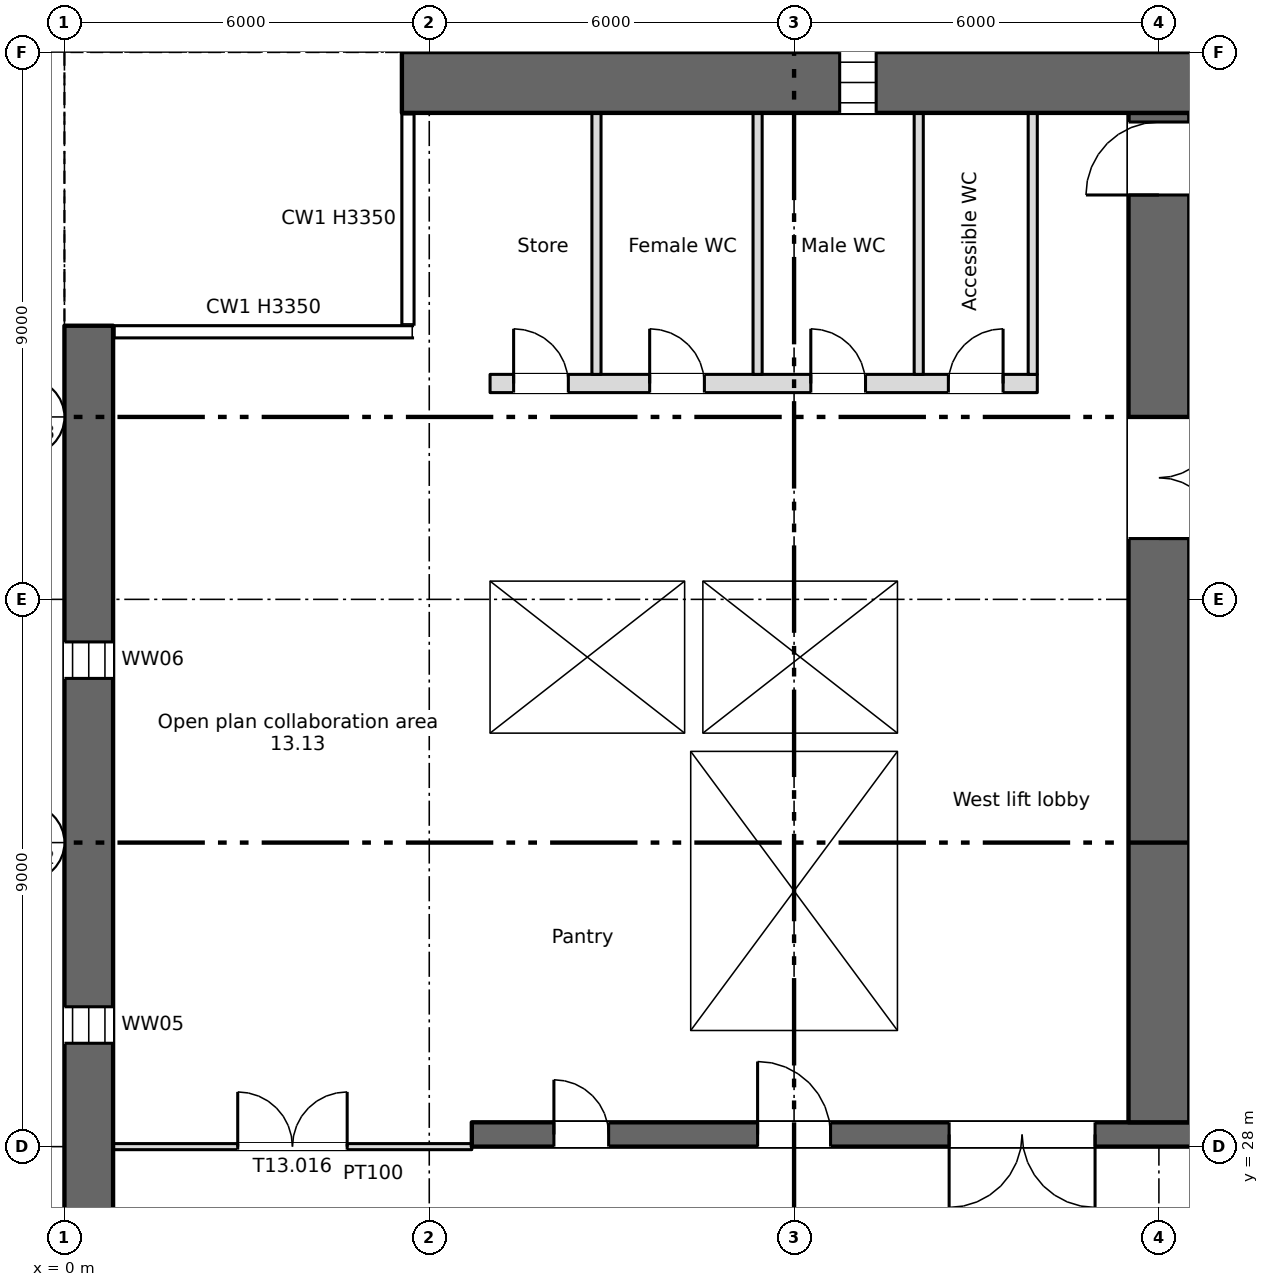
"""IFC4 building model, lengths in metres.
Left out: names, types, materials, properties, quantities, classifications, styles, units other than length and angle.
Written with IfcOpenShell. Run it as: python <this file> out.ifc"""

import sys

from ifc_helpers import new_model, si_unit, direction, frame, frame_2d, origin, place, context, subcontext, project, spatial, rectangle, extrude, element, fill, save


model = new_model("IFC4")
c1 = context("Model", 3, precision=1e-05, world=origin(), true_north=direction((0.0, 1.0)))
c2 = subcontext(c1, "Body", "Model", "MODEL_VIEW")
j1 = project(units=[si_unit("LENGTHUNIT", "METRE"), si_unit("PLANEANGLEUNIT", "RADIAN")], contexts=[c1])
p1 = place(None, origin())
s1 = spatial("IfcSite", under=j1, at=p1, CompositionType="ELEMENT")
p2 = place(p1, origin())
s2 = spatial("IfcBuilding", under=s1, at=p2, CompositionType="ELEMENT")
p3 = place(p2, frame((0.0, 0.0, 75.0)))
s3 = spatial("IfcBuildingStorey", under=s2, at=p3, CompositionType="ELEMENT", Elevation=75.0)
p4 = place(p3, frame((0.4, 4.5, 0.0), z_axis=(0.0, 0.0, 1.0), x_axis=(0.0, 1.0, 0.0)))
e1 = element("IfcWall", 1, at=p4, inside=s3, PredefinedType="SHEAR", context=c2, shape_type="SweptSolid", body=[
    extrude(rectangle(XDim=37.0, YDim=0.8, at=frame_2d((18.5, 0.0))), origin(), (0.0, 0.0, 1.0), 3.35),
])
p5 = place(p4, frame((1.2, 0.0, 0.6)))
e2 = element("IfcOpeningElement", 2, at=p5, cuts=e1, PredefinedType="OPENING", context=c2, shape_type="SweptSolid", body=[
    extrude(rectangle(XDim=0.6, YDim=2.4, at=frame_2d((0.3, 1.2))), frame((0.0, 0.41, 0.0), z_axis=(0.0, -1.0, 0.0), x_axis=(1.0, 0.0, 0.0)), (0.0, 0.0, 1.0), 0.82),
])
p6 = place(p4, frame((7.2, 0.0, 0.6)))
e3 = element("IfcOpeningElement", 3, at=p6, cuts=e1, PredefinedType="OPENING", context=c2, shape_type="SweptSolid", body=[
    extrude(rectangle(XDim=0.6, YDim=2.4, at=frame_2d((0.3, 1.2))), frame((0.0, 0.41, 0.0), z_axis=(0.0, -1.0, 0.0), x_axis=(1.0, 0.0, 0.0)), (0.0, 0.0, 1.0), 0.82),
])
p7 = place(p4, frame((13.2, 0.0, 0.6)))
e4 = element("IfcOpeningElement", 4, at=p7, cuts=e1, PredefinedType="OPENING", context=c2, shape_type="SweptSolid", body=[
    extrude(rectangle(XDim=0.6, YDim=2.4, at=frame_2d((0.3, 1.2))), frame((0.0, 0.41, 0.0), z_axis=(0.0, -1.0, 0.0), x_axis=(1.0, 0.0, 0.0)), (0.0, 0.0, 1.0), 0.82),
])
p8 = place(p4, frame((19.2, 0.0, 0.6)))
e5 = element("IfcOpeningElement", 5, at=p8, cuts=e1, PredefinedType="OPENING", context=c2, shape_type="SweptSolid", body=[
    extrude(rectangle(XDim=0.6, YDim=2.4, at=frame_2d((0.3, 1.2))), frame((0.0, 0.41, 0.0), z_axis=(0.0, -1.0, 0.0), x_axis=(1.0, 0.0, 0.0)), (0.0, 0.0, 1.0), 0.82),
])
p9 = place(p4, frame((25.2, 0.0, 0.6)))
e6 = element("IfcOpeningElement", 6, at=p9, cuts=e1, PredefinedType="OPENING", context=c2, shape_type="SweptSolid", body=[
    extrude(rectangle(XDim=0.6, YDim=2.4, at=frame_2d((0.3, 1.2))), frame((0.0, 0.41, 0.0), z_axis=(0.0, -1.0, 0.0), x_axis=(1.0, 0.0, 0.0)), (0.0, 0.0, 1.0), 0.82),
])
p10 = place(p4, frame((31.2, 0.0, 0.6)))
e7 = element("IfcOpeningElement", 7, at=p10, cuts=e1, PredefinedType="OPENING", context=c2, shape_type="SweptSolid", body=[
    extrude(rectangle(XDim=0.6, YDim=2.4, at=frame_2d((0.3, 1.2))), frame((0.0, 0.41, 0.0), z_axis=(0.0, -1.0, 0.0), x_axis=(1.0, 0.0, 0.0)), (0.0, 0.0, 1.0), 0.82),
])
p11 = place(p3, frame((5.55, 45.5, 0.0), z_axis=(0.0, 0.0, 1.0), x_axis=(1.0, 0.0, 0.0)))
e8 = element("IfcWall", 8, at=p11, inside=s3, PredefinedType="SHEAR", context=c2, shape_type="SweptSolid", body=[
    extrude(rectangle(XDim=66.9, YDim=1.0, at=frame_2d((33.45, 0.0))), origin(), (0.0, 0.0, 1.0), 3.35),
])
p12 = place(p11, frame((7.2, 0.0, 0.6)))
e9 = element("IfcOpeningElement", 9, at=p12, cuts=e8, PredefinedType="OPENING", context=c2, shape_type="SweptSolid", body=[
    extrude(rectangle(XDim=0.6, YDim=2.4, at=frame_2d((0.3, 1.2))), frame((0.0, 0.51, 0.0), z_axis=(0.0, -1.0, 0.0), x_axis=(1.0, 0.0, 0.0)), (0.0, 0.0, 1.0), 1.02),
])
p13 = place(p11, frame((61.2, 0.0, 0.6)))
e10 = element("IfcOpeningElement", 10, at=p13, cuts=e8, PredefinedType="OPENING", context=c2, shape_type="SweptSolid", body=[
    extrude(rectangle(XDim=0.6, YDim=2.4, at=frame_2d((0.3, 1.2))), frame((0.0, 0.51, 0.0), z_axis=(0.0, -1.0, 0.0), x_axis=(1.0, 0.0, 0.0)), (0.0, 0.0, 1.0), 1.02),
])
p14 = place(p3, frame((6.7, 28.2, 0.0), z_axis=(0.0, 0.0, 1.0), x_axis=(1.0, 0.0, 0.0)))
e11 = element("IfcWall", 11, at=p14, inside=s3, PredefinedType="SHEAR", context=c2, shape_type="SweptSolid", body=[
    extrude(rectangle(XDim=57.8, YDim=0.4, at=frame_2d((28.9, 0.0))), origin(), (0.0, 0.0, 1.0), 3.35),
])
p15 = place(p14, frame((12.062, 0.0, 0.0)))
e12 = element("IfcOpeningElement", 12, at=p15, cuts=e11, PredefinedType="OPENING", context=c2, shape_type="SweptSolid", body=[
    extrude(rectangle(XDim=0.9, YDim=2.1, at=frame_2d((0.45, 1.05))), frame((0.0, 0.21, 0.0), z_axis=(0.0, -1.0, 0.0), x_axis=(1.0, 0.0, 0.0)), (0.0, 0.0, 1.0), 0.42),
])
p16 = place(p14, frame((14.637, 0.0, 0.0)))
e13 = element("IfcOpeningElement", 13, at=p16, cuts=e11, PredefinedType="OPENING", context=c2, shape_type="SweptSolid", body=[
    extrude(rectangle(XDim=0.9, YDim=2.1, at=frame_2d((0.45, 1.05))), frame((0.0, 0.21, 0.0), z_axis=(0.0, -1.0, 0.0), x_axis=(1.0, 0.0, 0.0)), (0.0, 0.0, 1.0), 0.42),
])
p17 = place(p14, frame((49.062, 0.0, 0.0)))
e14 = element("IfcOpeningElement", 14, at=p17, cuts=e11, PredefinedType="OPENING", context=c2, shape_type="SweptSolid", body=[
    extrude(rectangle(XDim=0.9, YDim=2.1, at=frame_2d((0.45, 1.05))), frame((0.0, 0.21, 0.0), z_axis=(0.0, -1.0, 0.0), x_axis=(1.0, 0.0, 0.0)), (0.0, 0.0, 1.0), 0.42),
])
p18 = place(p14, frame((51.637, 0.0, 0.0)))
e15 = element("IfcOpeningElement", 15, at=p18, cuts=e11, PredefinedType="OPENING", context=c2, shape_type="SweptSolid", body=[
    extrude(rectangle(XDim=0.9, YDim=2.1, at=frame_2d((0.45, 1.05))), frame((0.0, 0.21, 0.0), z_axis=(0.0, -1.0, 0.0), x_axis=(1.0, 0.0, 0.0)), (0.0, 0.0, 1.0), 0.42),
])
p19 = place(p14, frame((1.35, 0.0, 0.0)))
e16 = element("IfcOpeningElement", 16, at=p19, cuts=e11, PredefinedType="OPENING", context=c2, shape_type="SweptSolid", body=[
    extrude(rectangle(XDim=0.9, YDim=2.1, at=frame_2d((0.45, 1.05))), frame((0.0, 0.21, 0.0), z_axis=(0.0, -1.0, 0.0), x_axis=(1.0, 0.0, 0.0)), (0.0, 0.0, 1.0), 0.42),
])
p20 = place(p14, frame((4.7, 0.0, 0.0)))
e17 = element("IfcOpeningElement", 17, at=p20, cuts=e11, PredefinedType="OPENING", context=c2, shape_type="SweptSolid", body=[
    extrude(rectangle(XDim=1.2, YDim=2.1, at=frame_2d((0.6, 1.05))), frame((0.0, 0.21, 0.0), z_axis=(0.0, -1.0, 0.0), x_axis=(1.0, 0.0, 0.0)), (0.0, 0.0, 1.0), 0.42),
])
p21 = place(p14, frame((31.7, 0.0, 0.0)))
e18 = element("IfcOpeningElement", 18, at=p21, cuts=e11, PredefinedType="OPENING", context=c2, shape_type="SweptSolid", body=[
    extrude(rectangle(XDim=1.2, YDim=2.1, at=frame_2d((0.6, 1.05))), frame((0.0, 0.21, 0.0), z_axis=(0.0, -1.0, 0.0), x_axis=(1.0, 0.0, 0.0)), (0.0, 0.0, 1.0), 0.42),
])
p22 = place(p14, frame((55.2, 0.0, 0.0)))
e19 = element("IfcOpeningElement", 19, at=p22, cuts=e11, PredefinedType="OPENING", context=c2, shape_type="SweptSolid", body=[
    extrude(rectangle(XDim=1.2, YDim=2.1, at=frame_2d((0.6, 1.05))), frame((0.0, 0.21, 0.0), z_axis=(0.0, -1.0, 0.0), x_axis=(1.0, 0.0, 0.0)), (0.0, 0.0, 1.0), 0.42),
])
p23 = place(p14, frame((21.7, 0.0, 0.0)))
e20 = element("IfcOpeningElement", 20, at=p23, cuts=e11, PredefinedType="OPENING", context=c2, shape_type="SweptSolid", body=[
    extrude(rectangle(XDim=1.2, YDim=2.1, at=frame_2d((0.6, 1.05))), frame((0.0, 0.21, 0.0), z_axis=(0.0, -1.0, 0.0), x_axis=(1.0, 0.0, 0.0)), (0.0, 0.0, 1.0), 0.42),
])
p24 = place(p14, frame((41.7, 0.0, 0.0)))
e21 = element("IfcOpeningElement", 21, at=p24, cuts=e11, PredefinedType="OPENING", context=c2, shape_type="SweptSolid", body=[
    extrude(rectangle(XDim=1.2, YDim=2.1, at=frame_2d((0.6, 1.05))), frame((0.0, 0.21, 0.0), z_axis=(0.0, -1.0, 0.0), x_axis=(1.0, 0.0, 0.0)), (0.0, 0.0, 1.0), 0.42),
])
p25 = place(p14, frame((24.85, 0.0, 0.0)))
e22 = element("IfcOpeningElement", 22, at=p25, cuts=e11, PredefinedType="OPENING", context=c2, shape_type="SweptSolid", body=[
    extrude(rectangle(XDim=2.4, YDim=2.1, at=frame_2d((1.2, 1.05))), frame((0.0, 0.21, 0.0), z_axis=(0.0, -1.0, 0.0), x_axis=(1.0, 0.0, 0.0)), (0.0, 0.0, 1.0), 0.42),
])
p26 = place(p14, frame((37.35, 0.0, 0.0)))
e23 = element("IfcOpeningElement", 23, at=p26, cuts=e11, PredefinedType="OPENING", context=c2, shape_type="SweptSolid", body=[
    extrude(rectangle(XDim=2.4, YDim=2.1, at=frame_2d((1.2, 1.05))), frame((0.0, 0.21, 0.0), z_axis=(0.0, -1.0, 0.0), x_axis=(1.0, 0.0, 0.0)), (0.0, 0.0, 1.0), 0.42),
])
p27 = place(p14, frame((7.85, 0.0, 0.0)))
e24 = element("IfcOpeningElement", 24, at=p27, cuts=e11, PredefinedType="OPENING", context=c2, shape_type="SweptSolid", body=[
    extrude(rectangle(XDim=2.4, YDim=2.1, at=frame_2d((1.2, 1.05))), frame((0.0, 0.21, 0.0), z_axis=(0.0, -1.0, 0.0), x_axis=(1.0, 0.0, 0.0)), (0.0, 0.0, 1.0), 0.42),
])
p28 = place(p14, frame((28.85, 0.0, 0.0)))
e25 = element("IfcOpeningElement", 25, at=p28, cuts=e11, PredefinedType="OPENING", context=c2, shape_type="SweptSolid", body=[
    extrude(rectangle(XDim=0.9, YDim=2.1, at=frame_2d((0.45, 1.05))), frame((0.0, 0.21, 0.0), z_axis=(0.0, -1.0, 0.0), x_axis=(1.0, 0.0, 0.0)), (0.0, 0.0, 1.0), 0.42),
])
p29 = place(p14, frame((34.85, 0.0, 0.0)))
e26 = element("IfcOpeningElement", 26, at=p29, cuts=e11, PredefinedType="OPENING", context=c2, shape_type="SweptSolid", body=[
    extrude(rectangle(XDim=0.9, YDim=2.1, at=frame_2d((0.45, 1.05))), frame((0.0, 0.21, 0.0), z_axis=(0.0, -1.0, 0.0), x_axis=(1.0, 0.0, 0.0)), (0.0, 0.0, 1.0), 0.42),
])
p30 = place(p3, frame((6.85, 28.4, 0.0), z_axis=(0.0, 0.0, 1.0), x_axis=(0.0, 1.0, 0.0)))
e27 = element("IfcWall", 27, at=p30, inside=s3, PredefinedType="SHEAR", context=c2, shape_type="SweptSolid", body=[
    extrude(rectangle(XDim=16.6, YDim=0.3, at=frame_2d((8.3, 0.0))), origin(), (0.0, 0.0, 1.0), 3.35),
])
p31 = place(p3, frame((18.0, 28.4, 0.0), z_axis=(0.0, 0.0, 1.0), x_axis=(0.0, 1.0, 0.0)))
e28 = element("IfcWall", 28, at=p31, inside=s3, PredefinedType="SHEAR", context=c2, shape_type="SweptSolid", body=[
    extrude(rectangle(XDim=16.6, YDim=1.0, at=frame_2d((8.3, 0.0))), origin(), (0.0, 0.0, 1.0), 3.35),
])
p32 = place(p31, frame((9.6, 0.0, 0.0)))
e29 = element("IfcOpeningElement", 29, at=p32, cuts=e28, PredefinedType="OPENING", context=c2, shape_type="SweptSolid", body=[
    extrude(rectangle(XDim=2.0, YDim=2.1, at=frame_2d((1.0, 1.05))), frame((0.0, 0.51, 0.0), z_axis=(0.0, -1.0, 0.0), x_axis=(1.0, 0.0, 0.0)), (0.0, 0.0, 1.0), 1.02),
])
p33 = place(p31, frame((15.25, 0.0, 0.0)))
e30 = element("IfcOpeningElement", 30, at=p33, cuts=e28, PredefinedType="OPENING", context=c2, shape_type="SweptSolid", body=[
    extrude(rectangle(XDim=1.2, YDim=2.1, at=frame_2d((0.6, 1.05))), frame((0.0, 0.51, 0.0), z_axis=(0.0, -1.0, 0.0), x_axis=(1.0, 0.0, 0.0)), (0.0, 0.0, 1.0), 1.02),
])
for number, where, z_axis, x_axis in (
    (31, (10.15, 28.4, 0.0), (0.0, 0.0, 1.0), (0.0, 1.0, 0.0)),
    (32, (13.85, 28.4, 0.0), (0.0, 0.0, 1.0), (0.0, 1.0, 0.0)),
):
    element("IfcWall", number, at=place(p3, frame(where, z_axis=z_axis, x_axis=x_axis)), inside=s3, PredefinedType="SHEAR", context=c2, shape_type="SweptSolid", body=[
        extrude(rectangle(XDim=6.1, YDim=0.3, at=frame_2d((3.05, 0.0))), origin(), (0.0, 0.0, 1.0), 3.35),
    ])
for number, where, z_axis, x_axis in (
    (33, (7.0, 34.65, 0.0), (0.0, 0.0, 1.0), (1.0, 0.0, 0.0)),
    (34, (7.0, 37.45, 0.0), (0.0, 0.0, 1.0), (1.0, 0.0, 0.0)),
):
    element("IfcWall", number, at=place(p3, frame(where, z_axis=z_axis, x_axis=x_axis)), inside=s3, PredefinedType="SHEAR", context=c2, shape_type="SweptSolid", body=[
        extrude(rectangle(XDim=7.0, YDim=0.3, at=frame_2d((3.5, 0.0))), origin(), (0.0, 0.0, 1.0), 3.35),
    ])
p34 = place(p3, frame((13.85, 34.8, 0.0), z_axis=(0.0, 0.0, 1.0), x_axis=(0.0, 1.0, 0.0)))
e35 = element("IfcWall", 35, at=p34, inside=s3, PredefinedType="SHEAR", context=c2, shape_type="SweptSolid", body=[
    extrude(rectangle(XDim=2.5, YDim=0.3, at=frame_2d((1.25, 0.0))), origin(), (0.0, 0.0, 1.0), 3.35),
])
p35 = place(p3, frame((7.0, 40.55, 0.0), z_axis=(0.0, 0.0, 1.0), x_axis=(1.0, 0.0, 0.0)))
e36 = element("IfcWall", 36, at=p35, inside=s3, PredefinedType="PARTITIONING", context=c2, shape_type="SweptSolid", body=[
    extrude(rectangle(XDim=9.0, YDim=0.3, at=frame_2d((4.5, 0.0))), origin(), (0.0, 0.0, 1.0), 3.35),
])
p36 = place(p35, frame((0.387, 0.0, 0.0)))
e37 = element("IfcOpeningElement", 37, at=p36, cuts=e36, PredefinedType="OPENING", context=c2, shape_type="SweptSolid", body=[
    extrude(rectangle(XDim=0.9, YDim=2.1, at=frame_2d((0.45, 1.05))), frame((0.0, 0.16, 0.0), z_axis=(0.0, -1.0, 0.0), x_axis=(1.0, 0.0, 0.0)), (0.0, 0.0, 1.0), 0.32),
])
p37 = place(p35, frame((2.625, 0.0, 0.0)))
e38 = element("IfcOpeningElement", 38, at=p37, cuts=e36, PredefinedType="OPENING", context=c2, shape_type="SweptSolid", body=[
    extrude(rectangle(XDim=0.9, YDim=2.1, at=frame_2d((0.45, 1.05))), frame((0.0, 0.16, 0.0), z_axis=(0.0, -1.0, 0.0), x_axis=(1.0, 0.0, 0.0)), (0.0, 0.0, 1.0), 0.32),
])
p38 = place(p35, frame((5.275, 0.0, 0.0)))
e39 = element("IfcOpeningElement", 39, at=p38, cuts=e36, PredefinedType="OPENING", context=c2, shape_type="SweptSolid", body=[
    extrude(rectangle(XDim=0.9, YDim=2.1, at=frame_2d((0.45, 1.05))), frame((0.0, 0.16, 0.0), z_axis=(0.0, -1.0, 0.0), x_axis=(1.0, 0.0, 0.0)), (0.0, 0.0, 1.0), 0.32),
])
p39 = place(p35, frame((7.538, 0.0, 0.0)))
e40 = element("IfcOpeningElement", 40, at=p39, cuts=e36, PredefinedType="OPENING", context=c2, shape_type="SweptSolid", body=[
    extrude(rectangle(XDim=0.9, YDim=2.1, at=frame_2d((0.45, 1.05))), frame((0.0, 0.16, 0.0), z_axis=(0.0, -1.0, 0.0), x_axis=(1.0, 0.0, 0.0)), (0.0, 0.0, 1.0), 0.32),
])
p40 = place(p3, frame((10.35, 34.8, 0.0), z_axis=(0.0, 0.0, 1.0), x_axis=(0.0, 1.0, 0.0)))
e41 = element("IfcWall", 41, at=p40, inside=s3, PredefinedType="SHEAR", context=c2, shape_type="SweptSolid", body=[
    extrude(rectangle(XDim=2.5, YDim=0.3, at=frame_2d((1.25, 0.0))), origin(), (0.0, 0.0, 1.0), 3.35),
])
for number, where, z_axis, x_axis in (
    (42, (15.925, 40.7, 0.0), (0.0, 0.0, 1.0), (0.0, 1.0, 0.0)),
    (43, (8.75, 40.7, 0.0), (0.0, 0.0, 1.0), (0.0, 1.0, 0.0)),
    (44, (11.4, 40.7, 0.0), (0.0, 0.0, 1.0), (0.0, 1.0, 0.0)),
    (45, (14.05, 40.7, 0.0), (0.0, 0.0, 1.0), (0.0, 1.0, 0.0)),
):
    element("IfcWall", number, at=place(p3, frame(where, z_axis=z_axis, x_axis=x_axis)), inside=s3, PredefinedType="PARTITIONING", context=c2, shape_type="SweptSolid", body=[
        extrude(rectangle(XDim=4.3, YDim=0.15, at=frame_2d((2.15, 0.0))), origin(), (0.0, 0.0, 1.0), 3.35),
    ])
p41 = place(p3, frame((0.8, 28.0, 0.0), z_axis=(0.0, 0.0, 1.0), x_axis=(1.0, 0.0, 0.0)))
e46 = element("IfcWall", 46, at=p41, inside=s3, PredefinedType="PARTITIONING", context=c2, shape_type="SweptSolid", body=[
    extrude(rectangle(XDim=5.9, YDim=0.1, at=frame_2d((2.95, 0.0))), origin(), (0.0, 0.0, 1.0), 3.35),
])
p42 = place(p41, frame((2.05, 0.0, 0.0)))
e47 = element("IfcOpeningElement", 47, at=p42, cuts=e46, PredefinedType="OPENING", context=c2, shape_type="SweptSolid", body=[
    extrude(rectangle(XDim=1.8, YDim=2.1, at=frame_2d((0.9, 1.05))), frame((0.0, 0.06, 0.0), z_axis=(0.0, -1.0, 0.0), x_axis=(1.0, 0.0, 0.0)), (0.0, 0.0, 1.0), 0.12),
])
p43 = place(p12, origin())
e48 = element("IfcWindow", 48, at=p43, inside=s3, PartitioningType="SINGLE_PANEL", PredefinedType="WINDOW", context=c2, shape_type="SweptSolid", body=[
    extrude(rectangle(XDim=0.6, YDim=2.4, at=frame_2d((0.3, 1.2))), frame((0.0, 0.03, 0.0), z_axis=(0.0, -1.0, 0.0), x_axis=(1.0, 0.0, 0.0)), (0.0, 0.0, 1.0), 0.06),
])
fill(e9, e48)
p44 = place(p9, origin())
e49 = element("IfcWindow", 49, at=p44, inside=s3, PartitioningType="SINGLE_PANEL", PredefinedType="WINDOW", context=c2, shape_type="SweptSolid", body=[
    extrude(rectangle(XDim=0.6, YDim=2.4, at=frame_2d((0.3, 1.2))), frame((0.0, 0.03, 0.0), z_axis=(0.0, -1.0, 0.0), x_axis=(1.0, 0.0, 0.0)), (0.0, 0.0, 1.0), 0.06),
])
fill(e6, e49)
p45 = place(p10, origin())
e50 = element("IfcWindow", 50, at=p45, inside=s3, PartitioningType="SINGLE_PANEL", PredefinedType="WINDOW", context=c2, shape_type="SweptSolid", body=[
    extrude(rectangle(XDim=0.6, YDim=2.4, at=frame_2d((0.3, 1.2))), frame((0.0, 0.03, 0.0), z_axis=(0.0, -1.0, 0.0), x_axis=(1.0, 0.0, 0.0)), (0.0, 0.0, 1.0), 0.06),
])
fill(e7, e50)
p46 = place(p19, origin())
e51 = element("IfcDoor", 51, at=p46, inside=s3, OperationType="SINGLE_SWING_LEFT", PredefinedType="DOOR", context=c2, shape_type="SweptSolid", body=[
    extrude(rectangle(XDim=0.9, YDim=2.1, at=frame_2d((0.45, 1.05))), frame((0.0, 0.025, 0.0), z_axis=(0.0, -1.0, 0.0), x_axis=(1.0, 0.0, 0.0)), (0.0, 0.0, 1.0), 0.05),
])
fill(e16, e51)
p47 = place(p36, origin())
e52 = element("IfcDoor", 52, at=p47, inside=s3, OperationType="SINGLE_SWING_LEFT", PredefinedType="DOOR", context=c2, shape_type="SweptSolid", body=[
    extrude(rectangle(XDim=0.9, YDim=2.1, at=frame_2d((0.45, 1.05))), frame((0.0, 0.025, 0.0), z_axis=(0.0, -1.0, 0.0), x_axis=(1.0, 0.0, 0.0)), (0.0, 0.0, 1.0), 0.05),
])
fill(e37, e52)
p48 = place(p37, origin())
e53 = element("IfcDoor", 53, at=p48, inside=s3, OperationType="SINGLE_SWING_LEFT", PredefinedType="DOOR", context=c2, shape_type="SweptSolid", body=[
    extrude(rectangle(XDim=0.9, YDim=2.1, at=frame_2d((0.45, 1.05))), frame((0.0, 0.025, 0.0), z_axis=(0.0, -1.0, 0.0), x_axis=(1.0, 0.0, 0.0)), (0.0, 0.0, 1.0), 0.05),
])
fill(e38, e53)
p49 = place(p38, origin())
e54 = element("IfcDoor", 54, at=p49, inside=s3, OperationType="SINGLE_SWING_LEFT", PredefinedType="DOOR", context=c2, shape_type="SweptSolid", body=[
    extrude(rectangle(XDim=0.9, YDim=2.1, at=frame_2d((0.45, 1.05))), frame((0.0, 0.025, 0.0), z_axis=(0.0, -1.0, 0.0), x_axis=(1.0, 0.0, 0.0)), (0.0, 0.0, 1.0), 0.05),
])
fill(e39, e54)
p50 = place(p39, origin())
e55 = element("IfcDoor", 55, at=p50, inside=s3, OperationType="SINGLE_SWING_RIGHT", PredefinedType="DOOR", context=c2, shape_type="SweptSolid", body=[
    extrude(rectangle(XDim=0.9, YDim=2.1, at=frame_2d((0.45, 1.05))), frame((0.0, 0.025, 0.0), z_axis=(0.0, -1.0, 0.0), x_axis=(1.0, 0.0, 0.0)), (0.0, 0.0, 1.0), 0.05),
])
fill(e40, e55)
p51 = place(p20, origin())
e56 = element("IfcDoor", 56, at=p51, inside=s3, OperationType="SINGLE_SWING_LEFT", PredefinedType="DOOR", context=c2, shape_type="SweptSolid", body=[
    extrude(rectangle(XDim=1.2, YDim=2.1, at=frame_2d((0.6, 1.05))), frame((0.0, 0.025, 0.0), z_axis=(0.0, -1.0, 0.0), x_axis=(1.0, 0.0, 0.0)), (0.0, 0.0, 1.0), 0.05),
])
fill(e17, e56)
p52 = place(p27, origin())
e57 = element("IfcDoor", 57, at=p52, inside=s3, OperationType="DOUBLE_DOOR_SINGLE_SWING", PredefinedType="DOOR", context=c2, shape_type="SweptSolid", body=[
    extrude(rectangle(XDim=2.4, YDim=2.1, at=frame_2d((1.2, 1.05))), frame((0.0, 0.025, 0.0), z_axis=(0.0, -1.0, 0.0), x_axis=(1.0, 0.0, 0.0)), (0.0, 0.0, 1.0), 0.05),
])
fill(e24, e57)
p53 = place(p32, origin())
e58 = element("IfcDoor", 58, at=p53, inside=s3, OperationType="DOUBLE_DOOR_SINGLE_SWING", PredefinedType="DOOR", context=c2, shape_type="SweptSolid", body=[
    extrude(rectangle(XDim=2.0, YDim=2.1, at=frame_2d((1.0, 1.05))), frame((0.0, 0.025, 0.0), z_axis=(0.0, -1.0, 0.0), x_axis=(1.0, 0.0, 0.0)), (0.0, 0.0, 1.0), 0.05),
])
fill(e29, e58)
p54 = place(p33, origin())
e59 = element("IfcDoor", 59, at=p54, inside=s3, OperationType="SINGLE_SWING_LEFT", PredefinedType="DOOR", context=c2, shape_type="SweptSolid", body=[
    extrude(rectangle(XDim=1.2, YDim=2.1, at=frame_2d((0.6, 1.05))), frame((0.0, 0.025, 0.0), z_axis=(0.0, -1.0, 0.0), x_axis=(1.0, 0.0, 0.0)), (0.0, 0.0, 1.0), 0.05),
])
fill(e30, e59)
p55 = place(p42, origin())
e60 = element("IfcDoor", 60, at=p55, inside=s3, OperationType="DOUBLE_DOOR_SINGLE_SWING", PredefinedType="DOOR", context=c2, shape_type="SweptSolid", body=[
    extrude(rectangle(XDim=1.8, YDim=2.1, at=frame_2d((0.9, 1.05))), frame((0.0, 0.025, 0.0), z_axis=(0.0, -1.0, 0.0), x_axis=(1.0, 0.0, 0.0)), (0.0, 0.0, 1.0), 0.05),
])
fill(e47, e60)
save(model, sys.argv[1])
